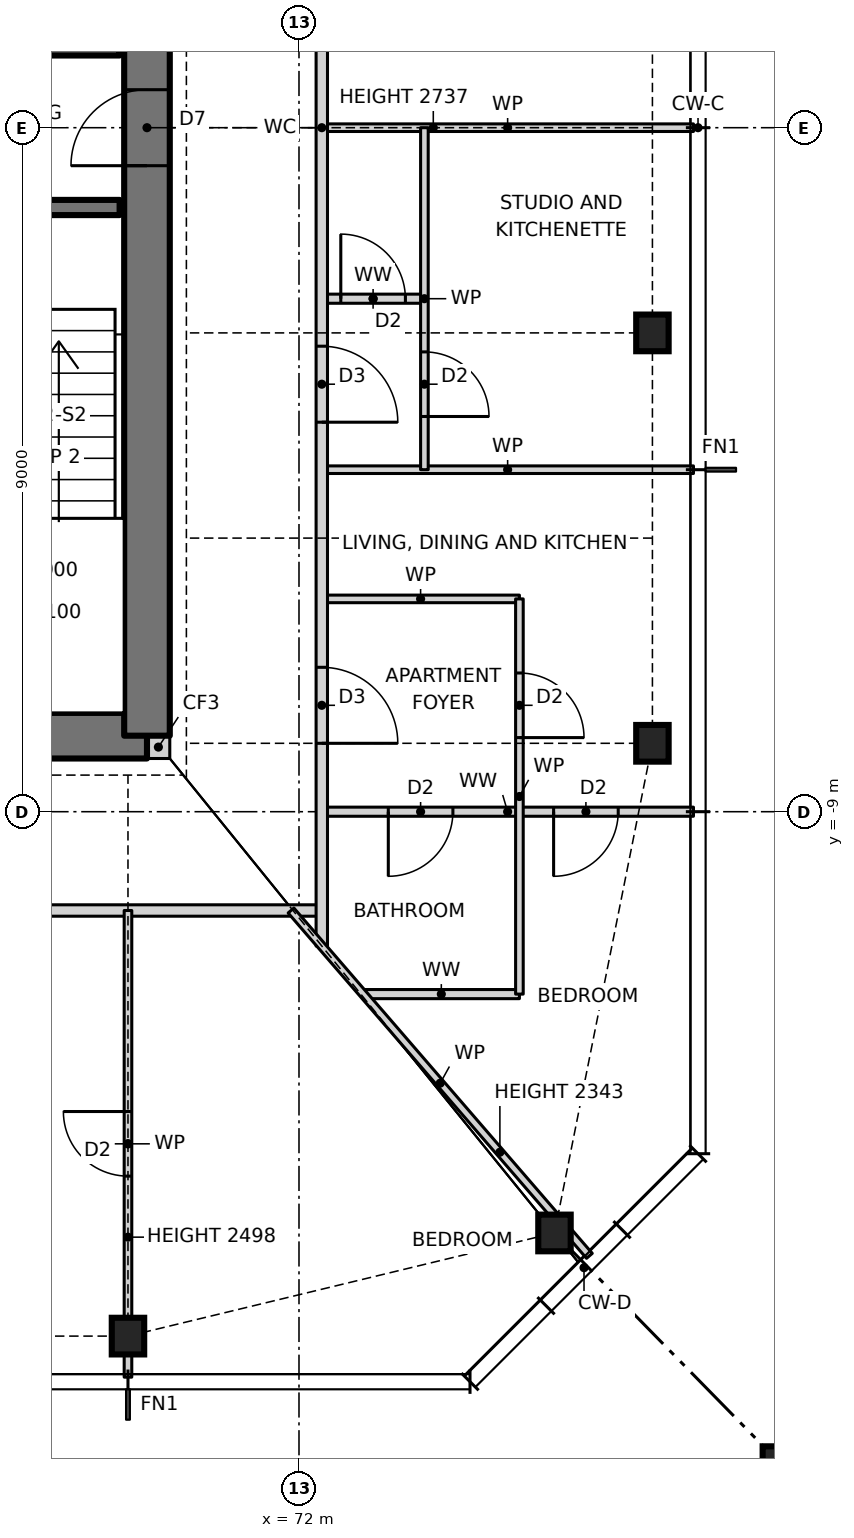
"""IFC4 building model, lengths in metres.
Left out: names, types, materials, properties, quantities, classifications, styles, units other than length and angle.
Written with IfcOpenShell. Run it as: python <this file> out.ifc"""

import sys

from ifc_helpers import new_model, si_unit, direction, frame, frame_2d, origin, origin_2d, place, context, subcontext, project, spatial, rectangle, hollow_rectangle, i_section, extrude, element, fill, save


model = new_model("IFC4")
c1 = context("Model", 3, precision=1e-05, world=origin(), true_north=direction((0.0, 1.0)))
c2 = subcontext(c1, "Body", "Model", "MODEL_VIEW")
j1 = project(units=[si_unit("LENGTHUNIT", "METRE"), si_unit("PLANEANGLEUNIT", "RADIAN")], contexts=[c1])
p1 = place(None, origin())
s1 = spatial("IfcSite", under=j1, at=p1, CompositionType="ELEMENT")
p2 = place(p1, origin())
s2 = spatial("IfcBuilding", under=s1, at=p2, CompositionType="ELEMENT")
p3 = place(p2, frame((0.0, 0.0, 94.5)))
s3 = spatial("IfcBuildingStorey", under=s2, at=p3, CompositionType="ELEMENT", Elevation=94.5)
for number, where, z_axis, x_axis in (
    (1, (69.75, -15.9, 0.0), (0.0, 0.0, 1.0), (1.0, 0.0, 0.0)),
    (2, (75.361, -14.543, 0.0), (0.0, 0.0, 1.0), (1.0, 0.0, 0.0)),
    (3, (76.65, -8.1, 0.0), (0.0, 0.0, 1.0), (1.0, 0.0, 0.0)),
    (4, (76.65, -2.7, 0.0), (0.0, 0.0, 1.0), (1.0, 0.0, 0.0)),
):
    element("IfcColumn", number, at=place(p3, frame(where, z_axis=z_axis, x_axis=x_axis)), inside=s3, PredefinedType="COLUMN", context=c2, shape_type="SweptSolid", body=[
        extrude(i_section(OverallWidth=0.427, OverallDepth=0.483, WebThickness=0.051, FlangeThickness=0.082, at=origin_2d()), origin(), (0.0, 0.0, 1.0), 3.5),
    ])
p4 = place(p3, frame((78.65, -17.9, 0.0), z_axis=(0.0, 0.0, 1.0), x_axis=(1.0, 0.0, 0.0)))
e5 = element("IfcColumn", 5, at=p4, inside=s3, PredefinedType="COLUMN", context=c2, shape_type="SweptSolid", body=[
    extrude(hollow_rectangle(XDim=1.1, YDim=1.1, WallThickness=0.06, at=origin_2d()), origin(), (0.0, 0.0, 1.0), 3.5),
])
p5 = place(p3, frame((70.0, -8.15, 0.0), z_axis=(0.0, 0.0, 1.0), x_axis=(1.0, 0.0, 0.0)))
e6 = element("IfcWall", 6, at=p5, inside=s3, PredefinedType="SOLIDWALL", context=c2, shape_type="SweptSolid", body=[
    extrude(rectangle(XDim=0.3, YDim=0.3, at=frame_2d((0.15, 0.0))), origin(), (0.0, 0.0, 1.0), 3.5),
])
p6 = place(p3, frame((56.0, -8.0, 0.0), z_axis=(0.0, 0.0, 1.0), x_axis=(1.0, 0.0, 0.0)))
e7 = element("IfcWall", 7, at=p6, inside=s3, PredefinedType="SHEAR", context=c2, shape_type="SweptSolid", body=[
    extrude(rectangle(XDim=14.0, YDim=0.6, at=frame_2d((7.0, 0.0))), origin(), (0.0, 0.0, 1.0), 3.5),
])
p7 = place(p6, frame((2.7, 0.0, 0.0)))
e8 = element("IfcOpeningElement", 8, at=p7, cuts=e7, PredefinedType="OPENING", context=c2, shape_type="SweptSolid", body=[
    extrude(rectangle(XDim=0.9, YDim=2.1, at=frame_2d((0.45, 1.05))), frame((0.0, 0.31, 0.0), z_axis=(0.0, -1.0, 0.0), x_axis=(1.0, 0.0, 0.0)), (0.0, 0.0, 1.0), 0.62),
])
p8 = place(p6, frame((7.7, 0.0, 0.0)))
e9 = element("IfcOpeningElement", 9, at=p8, cuts=e7, PredefinedType="OPENING", context=c2, shape_type="SweptSolid", body=[
    extrude(rectangle(XDim=0.9, YDim=2.1, at=frame_2d((0.45, 1.05))), frame((0.0, 0.31, 0.0), z_axis=(0.0, -1.0, 0.0), x_axis=(1.0, 0.0, 0.0)), (0.0, 0.0, 1.0), 0.62),
])
p9 = place(p3, frame((70.0, -8.0, 0.0), z_axis=(0.0, 0.0, 1.0), x_axis=(0.0, 1.0, 0.0)))
e10 = element("IfcWall", 10, at=p9, inside=s3, PredefinedType="SHEAR", context=c2, shape_type="SweptSolid", body=[
    extrude(rectangle(XDim=16.0, YDim=0.6, at=frame_2d((8.0, 0.0))), origin(), (0.0, 0.0, 1.0), 3.5),
])
p10 = place(p9, frame((7.5, 0.0, 0.0)))
e11 = element("IfcOpeningElement", 11, at=p10, cuts=e10, PredefinedType="OPENING", context=c2, shape_type="SweptSolid", body=[
    extrude(rectangle(XDim=1.0, YDim=2.1, at=frame_2d((0.5, 1.05))), frame((0.0, 0.31, 0.0), z_axis=(0.0, -1.0, 0.0), x_axis=(1.0, 0.0, 0.0)), (0.0, 0.0, 1.0), 0.62),
])
p11 = place(p3, frame((72.845, -11.4, 0.0), z_axis=(0.0, 0.0, 1.0), x_axis=(1.0, 0.0, 0.0)))
e12 = element("IfcWall", 12, at=p11, inside=s3, PredefinedType="PARTITIONING", context=c2, shape_type="SweptSolid", body=[
    extrude(rectangle(XDim=2.055, YDim=0.12, at=frame_2d((1.027, 0.0))), origin(), (0.0, 0.0, 1.0), 3.27),
])
p12 = place(p3, frame((53.7, -10.3, 0.0), z_axis=(0.0, 0.0, 1.0), x_axis=(1.0, 0.0, 0.0)))
e13 = element("IfcWall", 13, at=p12, inside=s3, PredefinedType="PARTITIONING", context=c2, shape_type="SweptSolid", body=[
    extrude(rectangle(XDim=18.6, YDim=0.15, at=frame_2d((9.3, 0.0))), origin(), (0.0, 0.0, 1.0), 3.27),
])
p13 = place(p12, frame((8.8, 0.0, 0.0)))
e14 = element("IfcOpeningElement", 14, at=p13, cuts=e13, PredefinedType="OPENING", context=c2, shape_type="SweptSolid", body=[
    extrude(rectangle(XDim=1.0, YDim=2.1, at=frame_2d((0.5, 1.05))), frame((0.0, 0.085, 0.0), z_axis=(0.0, -1.0, 0.0), x_axis=(1.0, 0.0, 0.0)), (0.0, 0.0, 1.0), 0.17),
])
p14 = place(p3, frame((72.3, -9.0, 0.0), z_axis=(0.0, 0.0, 1.0), x_axis=(1.0, 0.0, 0.0)))
e15 = element("IfcWall", 15, at=p14, inside=s3, PredefinedType="PARTITIONING", context=c2, shape_type="SweptSolid", body=[
    extrude(rectangle(XDim=4.89, YDim=0.12, at=frame_2d((2.445, 0.0))), origin(), (0.0, 0.0, 1.0), 3.27),
])
p15 = place(p14, frame((0.875, 0.0, 0.0)))
e16 = element("IfcOpeningElement", 16, at=p15, cuts=e15, PredefinedType="OPENING", context=c2, shape_type="SweptSolid", body=[
    extrude(rectangle(XDim=0.85, YDim=2.1, at=frame_2d((0.425, 1.05))), frame((0.0, 0.07, 0.0), z_axis=(0.0, -1.0, 0.0), x_axis=(1.0, 0.0, 0.0)), (0.0, 0.0, 1.0), 0.14),
])
p16 = place(p14, frame((3.05, 0.0, 0.0)))
e17 = element("IfcOpeningElement", 17, at=p16, cuts=e15, PredefinedType="OPENING", context=c2, shape_type="SweptSolid", body=[
    extrude(rectangle(XDim=0.85, YDim=2.1, at=frame_2d((0.425, 1.05))), frame((0.0, 0.07, 0.0), z_axis=(0.0, -1.0, 0.0), x_axis=(1.0, 0.0, 0.0)), (0.0, 0.0, 1.0), 0.14),
])
p17 = place(p3, frame((72.3, -6.2, 0.0), z_axis=(0.0, 0.0, 1.0), x_axis=(1.0, 0.0, 0.0)))
e18 = element("IfcWall", 18, at=p17, inside=s3, PredefinedType="PARTITIONING", context=c2, shape_type="SweptSolid", body=[
    extrude(rectangle(XDim=2.6, YDim=0.1, at=frame_2d((1.3, 0.0))), origin(), (0.0, 0.0, 1.0), 3.27),
])
p18 = place(p3, frame((72.3, -4.5, 0.0), z_axis=(0.0, 0.0, 1.0), x_axis=(1.0, 0.0, 0.0)))
e19 = element("IfcWall", 19, at=p18, inside=s3, PredefinedType="PARTITIONING", context=c2, shape_type="SweptSolid", body=[
    extrude(rectangle(XDim=4.89, YDim=0.1, at=frame_2d((2.445, 0.0))), origin(), (0.0, 0.0, 1.0), 3.27),
])
p19 = place(p3, frame((72.3, -2.25, 0.0), z_axis=(0.0, 0.0, 1.0), x_axis=(1.0, 0.0, 0.0)))
e20 = element("IfcWall", 20, at=p19, inside=s3, PredefinedType="PARTITIONING", context=c2, shape_type="SweptSolid", body=[
    extrude(rectangle(XDim=1.35, YDim=0.12, at=frame_2d((0.675, 0.0))), origin(), (0.0, 0.0, 1.0), 3.27),
])
p20 = place(p19, frame((0.25, 0.0, 0.0)))
e21 = element("IfcOpeningElement", 21, at=p20, cuts=e20, PredefinedType="OPENING", context=c2, shape_type="SweptSolid", body=[
    extrude(rectangle(XDim=0.85, YDim=2.1, at=frame_2d((0.425, 1.05))), frame((0.0, 0.07, 0.0), z_axis=(0.0, -1.0, 0.0), x_axis=(1.0, 0.0, 0.0)), (0.0, 0.0, 1.0), 0.14),
])
p21 = place(p3, frame((56.36, -1.05, 0.0), z_axis=(0.0, 0.0, 1.0), x_axis=(1.0, 0.0, 0.0)))
e22 = element("IfcWall", 22, at=p21, inside=s3, PredefinedType="SOLIDWALL", context=c2, shape_type="SweptSolid", body=[
    extrude(rectangle(XDim=13.28, YDim=0.2, at=frame_2d((6.64, 0.0))), origin(), (0.0, 0.0, 1.0), 3.5),
])
p22 = place(p21, frame((11.11, 0.0, 0.0)))
e23 = element("IfcOpeningElement", 23, at=p22, cuts=e22, PredefinedType="OPENING", context=c2, shape_type="SweptSolid", body=[
    extrude(rectangle(XDim=1.0, YDim=2.1, at=frame_2d((0.5, 1.05))), frame((0.0, 0.11, 0.0), z_axis=(0.0, -1.0, 0.0), x_axis=(1.0, 0.0, 0.0)), (0.0, 0.0, 1.0), 0.22),
])
p23 = place(p21, frame((1.087, 0.0, 0.0)))
e24 = element("IfcOpeningElement", 24, at=p23, cuts=e22, PredefinedType="OPENING", context=c2, shape_type="SweptSolid", body=[
    extrude(rectangle(XDim=1.1, YDim=2.1, at=frame_2d((0.55, 1.05))), frame((0.0, 0.11, 0.0), z_axis=(0.0, -1.0, 0.0), x_axis=(1.0, 0.0, 0.0)), (0.0, 0.0, 1.0), 0.22),
])
p24 = place(p21, frame((4.39, 0.0, 0.0)))
e25 = element("IfcOpeningElement", 25, at=p24, cuts=e22, PredefinedType="OPENING", context=c2, shape_type="SweptSolid", body=[
    extrude(rectangle(XDim=1.1, YDim=2.1, at=frame_2d((0.55, 1.05))), frame((0.0, 0.11, 0.0), z_axis=(0.0, -1.0, 0.0), x_axis=(1.0, 0.0, 0.0)), (0.0, 0.0, 1.0), 0.22),
])
p25 = place(p21, frame((7.724, 0.0, 0.0)))
e26 = element("IfcOpeningElement", 26, at=p25, cuts=e22, PredefinedType="OPENING", context=c2, shape_type="SweptSolid", body=[
    extrude(rectangle(XDim=1.1, YDim=2.1, at=frame_2d((0.55, 1.05))), frame((0.0, 0.11, 0.0), z_axis=(0.0, -1.0, 0.0), x_axis=(1.0, 0.0, 0.0)), (0.0, 0.0, 1.0), 0.22),
])
p26 = place(p3, frame((72.3, 0.0, 0.0), z_axis=(0.0, 0.0, 1.0), x_axis=(1.0, 0.0, 0.0)))
e27 = element("IfcWall", 27, at=p26, inside=s3, PredefinedType="PARTITIONING", context=c2, shape_type="SweptSolid", body=[
    extrude(rectangle(XDim=4.89, YDim=0.1, at=frame_2d((2.445, 0.0))), origin(), (0.0, 0.0, 1.0), 2.737),
])
p27 = place(p3, frame((56.36, 1.05, 0.0), z_axis=(0.0, 0.0, 1.0), x_axis=(1.0, 0.0, 0.0)))
e28 = element("IfcWall", 28, at=p27, inside=s3, PredefinedType="SOLIDWALL", context=c2, shape_type="SweptSolid", body=[
    extrude(rectangle(XDim=13.28, YDim=0.2, at=frame_2d((6.64, 0.0))), origin(), (0.0, 0.0, 1.0), 3.5),
])
p28 = place(p27, frame((1.17, 0.0, 0.0)))
e29 = element("IfcOpeningElement", 29, at=p28, cuts=e28, PredefinedType="OPENING", context=c2, shape_type="SweptSolid", body=[
    extrude(rectangle(XDim=1.0, YDim=2.1, at=frame_2d((0.5, 1.05))), frame((0.0, 0.11, 0.0), z_axis=(0.0, -1.0, 0.0), x_axis=(1.0, 0.0, 0.0)), (0.0, 0.0, 1.0), 0.22),
])
p29 = place(p27, frame((6.19, 0.0, 0.0)))
e30 = element("IfcOpeningElement", 30, at=p29, cuts=e28, PredefinedType="OPENING", context=c2, shape_type="SweptSolid", body=[
    extrude(rectangle(XDim=0.9, YDim=2.1, at=frame_2d((0.45, 1.05))), frame((0.0, 0.11, 0.0), z_axis=(0.0, -1.0, 0.0), x_axis=(1.0, 0.0, 0.0)), (0.0, 0.0, 1.0), 0.22),
])
p30 = place(p27, frame((10.96, 0.0, 0.0)))
e31 = element("IfcOpeningElement", 31, at=p30, cuts=e28, PredefinedType="OPENING", context=c2, shape_type="SweptSolid", body=[
    extrude(rectangle(XDim=1.3, YDim=2.1, at=frame_2d((0.65, 1.05))), frame((0.0, 0.11, 0.0), z_axis=(0.0, -1.0, 0.0), x_axis=(1.0, 0.0, 0.0)), (0.0, 0.0, 1.0), 0.22),
])
p31 = place(p3, frame((74.9, -11.4, 0.0), z_axis=(0.0, 0.0, 1.0), x_axis=(0.0, 1.0, 0.0)))
e32 = element("IfcWall", 32, at=p31, inside=s3, PredefinedType="PARTITIONING", context=c2, shape_type="SweptSolid", body=[
    extrude(rectangle(XDim=5.2, YDim=0.1, at=frame_2d((2.6, 0.0))), origin(), (0.0, 0.0, 1.0), 3.27),
])
p32 = place(p31, frame((3.375, 0.0, 0.0)))
e33 = element("IfcOpeningElement", 33, at=p32, cuts=e32, PredefinedType="OPENING", context=c2, shape_type="SweptSolid", body=[
    extrude(rectangle(XDim=0.85, YDim=2.1, at=frame_2d((0.425, 1.05))), frame((0.0, 0.06, 0.0), z_axis=(0.0, -1.0, 0.0), x_axis=(1.0, 0.0, 0.0)), (0.0, 0.0, 1.0), 0.12),
])
p33 = place(p3, frame((73.65, -4.5, 0.0), z_axis=(0.0, 0.0, 1.0), x_axis=(0.0, 1.0, 0.0)))
e34 = element("IfcWall", 34, at=p33, inside=s3, PredefinedType="PARTITIONING", context=c2, shape_type="SweptSolid", body=[
    extrude(rectangle(XDim=4.5, YDim=0.1, at=frame_2d((2.25, 0.0))), origin(), (0.0, 0.0, 1.0), 3.27),
])
p34 = place(p33, frame((0.7, 0.0, 0.0)))
e35 = element("IfcOpeningElement", 35, at=p34, cuts=e34, PredefinedType="OPENING", context=c2, shape_type="SweptSolid", body=[
    extrude(rectangle(XDim=0.85, YDim=2.1, at=frame_2d((0.425, 1.05))), frame((0.0, 0.06, 0.0), z_axis=(0.0, -1.0, 0.0), x_axis=(1.0, 0.0, 0.0)), (0.0, 0.0, 1.0), 0.12),
])
p35 = place(p3, frame((72.3, -10.768, 0.0), z_axis=(0.0, 0.0, 1.0), x_axis=(0.0, 1.0, 0.0)))
e36 = element("IfcWall", 36, at=p35, inside=s3, PredefinedType="PARTITIONING", context=c2, shape_type="SweptSolid", body=[
    extrude(rectangle(XDim=21.536, YDim=0.15, at=frame_2d((10.768, 0.0))), origin(), (0.0, 0.0, 1.0), 3.27),
])
p36 = place(p35, frame((2.668, 0.0, 0.0)))
e37 = element("IfcOpeningElement", 37, at=p36, cuts=e36, PredefinedType="OPENING", context=c2, shape_type="SweptSolid", body=[
    extrude(rectangle(XDim=1.0, YDim=2.1, at=frame_2d((0.5, 1.05))), frame((0.0, 0.085, 0.0), z_axis=(0.0, -1.0, 0.0), x_axis=(1.0, 0.0, 0.0)), (0.0, 0.0, 1.0), 0.17),
])
p37 = place(p35, frame((6.893, 0.0, 0.0)))
e38 = element("IfcOpeningElement", 38, at=p37, cuts=e36, PredefinedType="OPENING", context=c2, shape_type="SweptSolid", body=[
    extrude(rectangle(XDim=1.0, YDim=2.1, at=frame_2d((0.5, 1.05))), frame((0.0, 0.085, 0.0), z_axis=(0.0, -1.0, 0.0), x_axis=(1.0, 0.0, 0.0)), (0.0, 0.0, 1.0), 0.17),
])
p38 = place(p35, frame((16.168, 0.0, 0.0)))
e39 = element("IfcOpeningElement", 39, at=p38, cuts=e36, PredefinedType="OPENING", context=c2, shape_type="SweptSolid", body=[
    extrude(rectangle(XDim=1.0, YDim=2.1, at=frame_2d((0.5, 1.05))), frame((0.0, 0.085, 0.0), z_axis=(0.0, -1.0, 0.0), x_axis=(1.0, 0.0, 0.0)), (0.0, 0.0, 1.0), 0.17),
])
p39 = place(p3, frame((69.75, -16.44, 0.0), z_axis=(0.0, 0.0, 1.0), x_axis=(0.0, 1.0, 0.0)))
e40 = element("IfcWall", 40, at=p39, inside=s3, PredefinedType="PARTITIONING", context=c2, shape_type="SweptSolid", body=[
    extrude(rectangle(XDim=6.14, YDim=0.1, at=frame_2d((3.07, 0.0))), origin(), (0.0, 0.0, 1.0), 2.498),
])
p40 = place(p39, frame((2.645, 0.0, 0.0)))
e41 = element("IfcOpeningElement", 41, at=p40, cuts=e40, PredefinedType="OPENING", context=c2, shape_type="SweptSolid", body=[
    extrude(rectangle(XDim=0.85, YDim=2.1, at=frame_2d((0.425, 1.05))), frame((0.0, 0.06, 0.0), z_axis=(0.0, -1.0, 0.0), x_axis=(1.0, 0.0, 0.0)), (0.0, 0.0, 1.0), 0.12),
])
p41 = place(p3, frame((75.821, -14.844, 0.0), z_axis=(0.0, 0.0, 1.0), x_axis=(-0.65378286253, 0.756682211144, 0.0)))
e42 = element("IfcWall", 42, at=p41, inside=s3, PredefinedType="PARTITIONING", context=c2, shape_type="SweptSolid", body=[
    extrude(rectangle(XDim=6.005, YDim=0.1, at=frame_2d((3.002, 0.0))), origin(), (0.0, 0.0, 1.0), 2.343),
])
p42 = place(p40, origin())
e43 = element("IfcDoor", 43, at=p42, inside=s3, OperationType="SINGLE_SWING_RIGHT", PredefinedType="DOOR", context=c2, shape_type="SweptSolid", body=[
    extrude(rectangle(XDim=0.85, YDim=2.1, at=frame_2d((0.425, 1.05))), frame((0.0, 0.025, 0.0), z_axis=(0.0, -1.0, 0.0), x_axis=(1.0, 0.0, 0.0)), (0.0, 0.0, 1.0), 0.05),
])
fill(e41, e43)
p43 = place(p36, frame((1.0, 0.0, 0.0), z_axis=(0.0, 0.0, 1.0), x_axis=(-1.0, 0.0, 0.0)))
e44 = element("IfcDoor", 44, at=p43, inside=s3, OperationType="SINGLE_SWING_RIGHT", PredefinedType="DOOR", context=c2, shape_type="SweptSolid", body=[
    extrude(rectangle(XDim=1.0, YDim=2.1, at=frame_2d((0.5, 1.05))), frame((0.0, 0.025, 0.0), z_axis=(0.0, -1.0, 0.0), x_axis=(1.0, 0.0, 0.0)), (0.0, 0.0, 1.0), 0.05),
])
fill(e37, e44)
p44 = place(p32, frame((0.85, 0.0, 0.0), z_axis=(0.0, 0.0, 1.0), x_axis=(-1.0, 0.0, 0.0)))
e45 = element("IfcDoor", 45, at=p44, inside=s3, OperationType="SINGLE_SWING_RIGHT", PredefinedType="DOOR", context=c2, shape_type="SweptSolid", body=[
    extrude(rectangle(XDim=0.85, YDim=2.1, at=frame_2d((0.425, 1.05))), frame((0.0, 0.025, 0.0), z_axis=(0.0, -1.0, 0.0), x_axis=(1.0, 0.0, 0.0)), (0.0, 0.0, 1.0), 0.05),
])
fill(e33, e45)
p45 = place(p15, frame((0.85, 0.0, 0.0), z_axis=(0.0, 0.0, 1.0), x_axis=(-1.0, 0.0, 0.0)))
e46 = element("IfcDoor", 46, at=p45, inside=s3, OperationType="SINGLE_SWING_RIGHT", PredefinedType="DOOR", context=c2, shape_type="SweptSolid", body=[
    extrude(rectangle(XDim=0.85, YDim=2.1, at=frame_2d((0.425, 1.05))), frame((0.0, 0.025, 0.0), z_axis=(0.0, -1.0, 0.0), x_axis=(1.0, 0.0, 0.0)), (0.0, 0.0, 1.0), 0.05),
])
fill(e16, e46)
p46 = place(p16, frame((0.85, 0.0, 0.0), z_axis=(0.0, 0.0, 1.0), x_axis=(-1.0, 0.0, 0.0)))
e47 = element("IfcDoor", 47, at=p46, inside=s3, OperationType="SINGLE_SWING_RIGHT", PredefinedType="DOOR", context=c2, shape_type="SweptSolid", body=[
    extrude(rectangle(XDim=0.85, YDim=2.1, at=frame_2d((0.425, 1.05))), frame((0.0, 0.025, 0.0), z_axis=(0.0, -1.0, 0.0), x_axis=(1.0, 0.0, 0.0)), (0.0, 0.0, 1.0), 0.05),
])
fill(e17, e47)
p47 = place(p34, frame((0.85, 0.0, 0.0), z_axis=(0.0, 0.0, 1.0), x_axis=(-1.0, 0.0, 0.0)))
e48 = element("IfcDoor", 48, at=p47, inside=s3, OperationType="SINGLE_SWING_RIGHT", PredefinedType="DOOR", context=c2, shape_type="SweptSolid", body=[
    extrude(rectangle(XDim=0.85, YDim=2.1, at=frame_2d((0.425, 1.05))), frame((0.0, 0.025, 0.0), z_axis=(0.0, -1.0, 0.0), x_axis=(1.0, 0.0, 0.0)), (0.0, 0.0, 1.0), 0.05),
])
fill(e35, e48)
p48 = place(p37, frame((1.0, 0.0, 0.0), z_axis=(0.0, 0.0, 1.0), x_axis=(-1.0, 0.0, 0.0)))
e49 = element("IfcDoor", 49, at=p48, inside=s3, OperationType="SINGLE_SWING_RIGHT", PredefinedType="DOOR", context=c2, shape_type="SweptSolid", body=[
    extrude(rectangle(XDim=1.0, YDim=2.1, at=frame_2d((0.5, 1.05))), frame((0.0, 0.025, 0.0), z_axis=(0.0, -1.0, 0.0), x_axis=(1.0, 0.0, 0.0)), (0.0, 0.0, 1.0), 0.05),
])
fill(e38, e49)
p49 = place(p20, origin())
e50 = element("IfcDoor", 50, at=p49, inside=s3, OperationType="SINGLE_SWING_LEFT", PredefinedType="DOOR", context=c2, shape_type="SweptSolid", body=[
    extrude(rectangle(XDim=0.85, YDim=2.1, at=frame_2d((0.425, 1.05))), frame((0.0, 0.025, 0.0), z_axis=(0.0, -1.0, 0.0), x_axis=(1.0, 0.0, 0.0)), (0.0, 0.0, 1.0), 0.05),
])
fill(e21, e50)
p50 = place(p10, origin())
e51 = element("IfcDoor", 51, at=p50, inside=s3, OperationType="SINGLE_SWING_LEFT", PredefinedType="DOOR", context=c2, shape_type="SweptSolid", body=[
    extrude(rectangle(XDim=1.0, YDim=2.1, at=frame_2d((0.5, 1.05))), frame((0.0, 0.025, 0.0), z_axis=(0.0, -1.0, 0.0), x_axis=(1.0, 0.0, 0.0)), (0.0, 0.0, 1.0), 0.05),
])
fill(e11, e51)
save(model, sys.argv[1])
